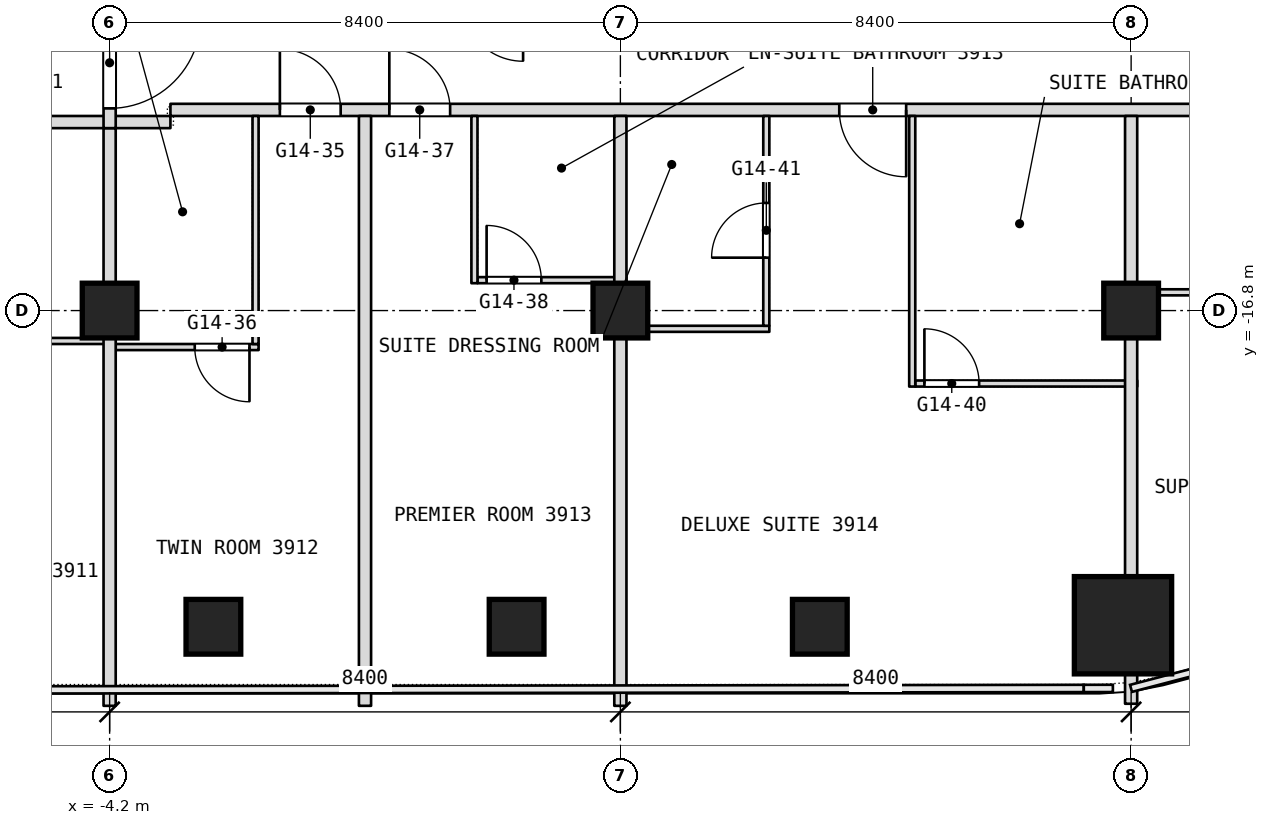
"""IFC4 building model, lengths in metres.
Left out: names, types, materials, properties, quantities, classifications, styles, units other than length and angle.
Written with IfcOpenShell. Run it as: python <this file> out.ifc"""

import sys

from ifc_helpers import new_model, si_unit, direction, frame, frame_2d, origin, origin_2d, place, context, subcontext, project, spatial, rectangle, extrude, element, fill, save


model = new_model("IFC4")
c1 = context("Model", 3, precision=1e-05, world=origin(), true_north=direction((0.0, 1.0)))
c2 = subcontext(c1, "Body", "Model", "MODEL_VIEW")
j1 = project(units=[si_unit("LENGTHUNIT", "METRE"), si_unit("PLANEANGLEUNIT", "RADIAN")], contexts=[c1])
p1 = place(None, origin())
s1 = spatial("IfcSite", under=j1, at=p1, CompositionType="ELEMENT")
p2 = place(p1, origin())
s2 = spatial("IfcBuilding", under=s1, at=p2, CompositionType="ELEMENT")
p3 = place(p2, frame((0.0, 0.0, 166.1)))
s3 = spatial("IfcBuildingStorey", under=s2, at=p3, CompositionType="ELEMENT", Elevation=166.1)
p4 = place(p3, frame((12.466, -21.975, 0.0), z_axis=(0.0, 0.0, 1.0), x_axis=(1.0, 0.0, 0.0)))
e1 = element("IfcColumn", 1, at=p4, inside=s3, PredefinedType="COLUMN", context=c2, shape_type="SweptSolid", body=[
    extrude(rectangle(XDim=1.6, YDim=1.6, at=origin_2d()), origin(), (0.0, 0.0, 1.0), 3.6),
])
for number, where, z_axis, x_axis in (
    (2, (-4.2, -16.8, 0.0), (0.0, 0.0, 1.0), (1.0, 0.0, 0.0)),
    (3, (4.2, -16.8, 0.0), (0.0, 0.0, 1.0), (1.0, 0.0, 0.0)),
    (4, (12.6, -16.8, 0.0), (0.0, 0.0, 1.0), (1.0, 0.0, 0.0)),
    (5, (7.48, -22.0, 0.0), (0.0, 0.0, 1.0), (1.0, 0.0, 0.0)),
    (6, (2.493, -22.0, 0.0), (0.0, 0.0, 1.0), (1.0, 0.0, 0.0)),
    (7, (-2.493, -22.0, 0.0), (0.0, 0.0, 1.0), (1.0, 0.0, 0.0)),
):
    element("IfcColumn", number, at=place(p3, frame(where, z_axis=z_axis, x_axis=x_axis)), inside=s3, PredefinedType="COLUMN", context=c2, shape_type="SweptSolid", body=[
        extrude(rectangle(XDim=0.9, YDim=0.9, at=origin_2d()), origin(), (0.0, 0.0, 1.0), 3.6),
    ])
p5 = place(p3, frame((9.05, -18.0, 0.0), z_axis=(0.0, 0.0, 1.0), x_axis=(1.0, 0.0, 0.0)))
e8 = element("IfcWall", 8, at=p5, inside=s3, PredefinedType="PARTITIONING", context=c2, shape_type="SweptSolid", body=[
    extrude(rectangle(XDim=3.65, YDim=0.1, at=frame_2d((1.825, 0.0))), origin(), (0.0, 0.0, 1.0), 3.3),
])
p6 = place(p5, frame((0.15, 0.0, 0.0)))
e9 = element("IfcOpeningElement", 9, at=p6, cuts=e8, PredefinedType="OPENING", context=c2, shape_type="SweptSolid", body=[
    extrude(rectangle(XDim=0.9, YDim=2.1, at=frame_2d((0.45, 1.05))), frame((0.0, 0.05, 0.0), z_axis=(0.0, -1.0, 0.0), x_axis=(1.0, 0.0, 0.0)), (0.0, 0.0, 1.0), 0.1),
])
p7 = place(p3, frame((-4.1, -17.4, 0.0), z_axis=(0.0, 0.0, 1.0), x_axis=(1.0, 0.0, 0.0)))
e10 = element("IfcWall", 10, at=p7, inside=s3, PredefinedType="PARTITIONING", context=c2, shape_type="SweptSolid", body=[
    extrude(rectangle(XDim=2.35, YDim=0.1, at=frame_2d((1.175, 0.0))), origin(), (0.0, 0.0, 1.0), 3.3),
])
p8 = place(p7, frame((1.3, 0.0, 0.0)))
e11 = element("IfcOpeningElement", 11, at=p8, cuts=e10, PredefinedType="OPENING", context=c2, shape_type="SweptSolid", body=[
    extrude(rectangle(XDim=0.9, YDim=2.1, at=frame_2d((0.45, 1.05))), frame((0.0, 0.05, 0.0), z_axis=(0.0, -1.0, 0.0), x_axis=(1.0, 0.0, 0.0)), (0.0, 0.0, 1.0), 0.1),
])
p9 = place(p3, frame((-6.55, -17.3, 0.0), z_axis=(0.0, 0.0, 1.0), x_axis=(1.0, 0.0, 0.0)))
e12 = element("IfcWall", 12, at=p9, inside=s3, PredefinedType="PARTITIONING", context=c2, shape_type="SweptSolid", body=[
    extrude(rectangle(XDim=2.45, YDim=0.1, at=frame_2d((1.225, 0.0))), origin(), (0.0, 0.0, 1.0), 3.3),
])
p10 = place(p9, frame((0.15, 0.0, 0.0)))
e13 = element("IfcOpeningElement", 13, at=p10, cuts=e12, PredefinedType="OPENING", context=c2, shape_type="SweptSolid", body=[
    extrude(rectangle(XDim=0.9, YDim=2.1, at=frame_2d((0.45, 1.05))), frame((0.0, 0.05, 0.0), z_axis=(0.0, -1.0, 0.0), x_axis=(1.0, 0.0, 0.0)), (0.0, 0.0, 1.0), 0.1),
])
p11 = place(p3, frame((4.3, -17.1, 0.0), z_axis=(0.0, 0.0, 1.0), x_axis=(1.0, 0.0, 0.0)))
e14 = element("IfcWall", 14, at=p11, inside=s3, PredefinedType="PARTITIONING", context=c2, shape_type="SweptSolid", body=[
    extrude(rectangle(XDim=2.35, YDim=0.1, at=frame_2d((1.175, 0.0))), origin(), (0.0, 0.0, 1.0), 3.3),
])
p12 = place(p3, frame((12.7, -16.5, 0.0), z_axis=(0.0, 0.0, 1.0), x_axis=(1.0, 0.0, 0.0)))
e15 = element("IfcWall", 15, at=p12, inside=s3, PredefinedType="PARTITIONING", context=c2, shape_type="SweptSolid", body=[
    extrude(rectangle(XDim=2.35, YDim=0.1, at=frame_2d((1.175, 0.0))), origin(), (0.0, 0.0, 1.0), 3.3),
])
p13 = place(p12, frame((1.3, 0.0, 0.0)))
e16 = element("IfcOpeningElement", 16, at=p13, cuts=e15, PredefinedType="OPENING", context=c2, shape_type="SweptSolid", body=[
    extrude(rectangle(XDim=0.9, YDim=2.1, at=frame_2d((0.45, 1.05))), frame((0.0, 0.05, 0.0), z_axis=(0.0, -1.0, 0.0), x_axis=(1.0, 0.0, 0.0)), (0.0, 0.0, 1.0), 0.1),
])
p14 = place(p3, frame((1.85, -16.3, 0.0), z_axis=(0.0, 0.0, 1.0), x_axis=(1.0, 0.0, 0.0)))
e17 = element("IfcWall", 17, at=p14, inside=s3, PredefinedType="PARTITIONING", context=c2, shape_type="SweptSolid", body=[
    extrude(rectangle(XDim=2.45, YDim=0.1, at=frame_2d((1.225, 0.0))), origin(), (0.0, 0.0, 1.0), 3.3),
])
p15 = place(p14, frame((0.15, 0.0, 0.0)))
e18 = element("IfcOpeningElement", 18, at=p15, cuts=e17, PredefinedType="OPENING", context=c2, shape_type="SweptSolid", body=[
    extrude(rectangle(XDim=0.9, YDim=2.1, at=frame_2d((0.45, 1.05))), frame((0.0, 0.05, 0.0), z_axis=(0.0, -1.0, 0.0), x_axis=(1.0, 0.0, 0.0)), (0.0, 0.0, 1.0), 0.1),
])
p16 = place(p3, frame((-12.4, -13.7, 0.0), z_axis=(0.0, 0.0, 1.0), x_axis=(1.0, 0.0, 0.0)))
e19 = element("IfcWall", 19, at=p16, inside=s3, PredefinedType="PARTITIONING", context=c2, shape_type="SweptSolid", body=[
    extrude(rectangle(XDim=9.2, YDim=0.2, at=frame_2d((4.6, 0.0))), origin(), (0.0, 0.0, 1.0), 3.3),
])
p17 = place(p16, frame((1.35, 0.0, 0.0)))
e20 = element("IfcOpeningElement", 20, at=p17, cuts=e19, PredefinedType="OPENING", context=c2, shape_type="SweptSolid", body=[
    extrude(rectangle(XDim=1.1, YDim=2.1, at=frame_2d((0.55, 1.05))), frame((0.0, 0.1, 0.0), z_axis=(0.0, -1.0, 0.0), x_axis=(1.0, 0.0, 0.0)), (0.0, 0.0, 1.0), 0.2),
])
p18 = place(p3, frame((-3.2, -13.5, 0.0), z_axis=(0.0, 0.0, 1.0), x_axis=(1.0, 0.0, 0.0)))
e21 = element("IfcWall", 21, at=p18, inside=s3, PredefinedType="PARTITIONING", context=c2, shape_type="SweptSolid", body=[
    extrude(rectangle(XDim=19.9, YDim=0.2, at=frame_2d((9.95, 0.0))), origin(), (0.0, 0.0, 1.0), 3.3),
])
p19 = place(p18, frame((1.8, 0.0, 0.0)))
e22 = element("IfcOpeningElement", 22, at=p19, cuts=e21, PredefinedType="OPENING", context=c2, shape_type="SweptSolid", body=[
    extrude(rectangle(XDim=1.0, YDim=2.1, at=frame_2d((0.5, 1.05))), frame((0.0, 0.1, 0.0), z_axis=(0.0, -1.0, 0.0), x_axis=(1.0, 0.0, 0.0)), (0.0, 0.0, 1.0), 0.2),
])
p20 = place(p18, frame((3.6, 0.0, 0.0)))
e23 = element("IfcOpeningElement", 23, at=p20, cuts=e21, PredefinedType="OPENING", context=c2, shape_type="SweptSolid", body=[
    extrude(rectangle(XDim=1.0, YDim=2.1, at=frame_2d((0.5, 1.05))), frame((0.0, 0.1, 0.0), z_axis=(0.0, -1.0, 0.0), x_axis=(1.0, 0.0, 0.0)), (0.0, 0.0, 1.0), 0.2),
])
p21 = place(p18, frame((11.0, 0.0, 0.0)))
e24 = element("IfcOpeningElement", 24, at=p21, cuts=e21, PredefinedType="OPENING", context=c2, shape_type="SweptSolid", body=[
    extrude(rectangle(XDim=1.1, YDim=2.1, at=frame_2d((0.55, 1.05))), frame((0.0, 0.1, 0.0), z_axis=(0.0, -1.0, 0.0), x_axis=(1.0, 0.0, 0.0)), (0.0, 0.0, 1.0), 0.2),
])
p22 = place(p18, frame((18.6, 0.0, 0.0)))
e25 = element("IfcOpeningElement", 25, at=p22, cuts=e21, PredefinedType="OPENING", context=c2, shape_type="SweptSolid", body=[
    extrude(rectangle(XDim=1.0, YDim=2.1, at=frame_2d((0.5, 1.05))), frame((0.0, 0.1, 0.0), z_axis=(0.0, -1.0, 0.0), x_axis=(1.0, 0.0, 0.0)), (0.0, 0.0, 1.0), 0.2),
])
p23 = place(p3, frame((12.6, -23.266, 0.0), z_axis=(0.0, 0.0, 1.0), x_axis=(0.0, 1.0, 0.0)))
e26 = element("IfcWall", 26, at=p23, inside=s3, PredefinedType="PARTITIONING", context=c2, shape_type="SweptSolid", body=[
    extrude(rectangle(XDim=0.491, YDim=0.2, at=frame_2d((0.246, 0.0))), origin(), (0.0, 0.0, 1.0), 3.3),
])
p24 = place(p3, frame((12.6, -21.175, 0.0), z_axis=(0.0, 0.0, 1.0), x_axis=(0.0, 1.0, 0.0)))
e27 = element("IfcWall", 27, at=p24, inside=s3, PredefinedType="PARTITIONING", context=c2, shape_type="SweptSolid", body=[
    extrude(rectangle(XDim=7.575, YDim=0.2, at=frame_2d((3.788, 0.0))), origin(), (0.0, 0.0, 1.0), 2.486),
])
p25 = place(p3, frame((9.0, -18.05, 0.0), z_axis=(0.0, 0.0, 1.0), x_axis=(0.0, 1.0, 0.0)))
e28 = element("IfcWall", 28, at=p25, inside=s3, PredefinedType="PARTITIONING", context=c2, shape_type="SweptSolid", body=[
    extrude(rectangle(XDim=4.45, YDim=0.1, at=frame_2d((2.225, 0.0))), origin(), (0.0, 0.0, 1.0), 3.3),
])
p26 = place(p3, frame((6.6, -17.05, 0.0), z_axis=(0.0, 0.0, 1.0), x_axis=(0.0, 1.0, 0.0)))
e29 = element("IfcWall", 29, at=p26, inside=s3, PredefinedType="PARTITIONING", context=c2, shape_type="SweptSolid", body=[
    extrude(rectangle(XDim=3.45, YDim=0.1, at=frame_2d((1.725, 0.0))), origin(), (0.0, 0.0, 1.0), 3.3),
])
p27 = place(p26, frame((1.12, 0.0, 0.0)))
e30 = element("IfcOpeningElement", 30, at=p27, cuts=e29, PredefinedType="OPENING", context=c2, shape_type="SweptSolid", body=[
    extrude(rectangle(XDim=0.9, YDim=2.1, at=frame_2d((0.45, 1.05))), frame((0.0, 0.05, 0.0), z_axis=(0.0, -1.0, 0.0), x_axis=(1.0, 0.0, 0.0)), (0.0, 0.0, 1.0), 0.1),
])
p28 = place(p3, frame((4.2, -23.3, 0.0), z_axis=(0.0, 0.0, 1.0), x_axis=(0.0, 1.0, 0.0)))
e31 = element("IfcWall", 31, at=p28, inside=s3, PredefinedType="PARTITIONING", context=c2, shape_type="SweptSolid", body=[
    extrude(rectangle(XDim=9.7, YDim=0.2, at=frame_2d((4.85, 0.0))), origin(), (0.0, 0.0, 1.0), 2.486),
])
p29 = place(p3, frame((1.8, -16.35, 0.0), z_axis=(0.0, 0.0, 1.0), x_axis=(0.0, 1.0, 0.0)))
e32 = element("IfcWall", 32, at=p29, inside=s3, PredefinedType="PARTITIONING", context=c2, shape_type="SweptSolid", body=[
    extrude(rectangle(XDim=2.75, YDim=0.1, at=frame_2d((1.375, 0.0))), origin(), (0.0, 0.0, 1.0), 3.3),
])
p30 = place(p3, frame((0.0, -23.3, 0.0), z_axis=(0.0, 0.0, 1.0), x_axis=(0.0, 1.0, 0.0)))
e33 = element("IfcWall", 33, at=p30, inside=s3, PredefinedType="PARTITIONING", context=c2, shape_type="SweptSolid", body=[
    extrude(rectangle(XDim=9.7, YDim=0.2, at=frame_2d((4.85, 0.0))), origin(), (0.0, 0.0, 1.0), 3.3),
])
p31 = place(p3, frame((-1.8, -17.35, 0.0), z_axis=(0.0, 0.0, 1.0), x_axis=(0.0, 1.0, 0.0)))
e34 = element("IfcWall", 34, at=p31, inside=s3, PredefinedType="PARTITIONING", context=c2, shape_type="SweptSolid", body=[
    extrude(rectangle(XDim=3.75, YDim=0.1, at=frame_2d((1.875, 0.0))), origin(), (0.0, 0.0, 1.0), 3.3),
])
p32 = place(p3, frame((-4.2, -23.3, 0.0), z_axis=(0.0, 0.0, 1.0), x_axis=(0.0, 1.0, 0.0)))
e35 = element("IfcWall", 35, at=p32, inside=s3, PredefinedType="PARTITIONING", context=c2, shape_type="SweptSolid", body=[
    extrude(rectangle(XDim=9.5, YDim=0.2, at=frame_2d((4.75, 0.0))), origin(), (0.0, 0.0, 1.0), 2.486),
])
p33 = place(p3, frame((-4.2, -13.8, 0.0), z_axis=(0.0, 0.0, 1.0), x_axis=(0.0, 1.0, 0.0)))
e36 = element("IfcWall", 36, at=p33, inside=s3, PredefinedType="PARTITIONING", context=c2, shape_type="SweptSolid", body=[
    extrude(rectangle(XDim=13.8, YDim=0.2, at=frame_2d((6.9, 0.0))), origin(), (0.0, 0.0, 1.0), 2.486),
])
p34 = place(p33, frame((12.15, 0.0, 0.0)))
e37 = element("IfcOpeningElement", 37, at=p34, cuts=e36, PredefinedType="OPENING", context=c2, shape_type="SweptSolid", body=[
    extrude(rectangle(XDim=1.5, YDim=2.1, at=frame_2d((0.75, 1.05))), frame((0.0, 0.1, 0.0), z_axis=(0.0, -1.0, 0.0), x_axis=(1.0, 0.0, 0.0)), (0.0, 0.0, 1.0), 0.2),
])
p35 = place(p33, frame((0.325, 0.0, 0.0)))
e38 = element("IfcOpeningElement", 38, at=p35, cuts=e36, PredefinedType="OPENING", context=c2, shape_type="SweptSolid", body=[
    extrude(rectangle(XDim=1.5, YDim=2.1, at=frame_2d((0.75, 1.05))), frame((0.0, 0.1, 0.0), z_axis=(0.0, -1.0, 0.0), x_axis=(1.0, 0.0, 0.0)), (0.0, 0.0, 1.0), 0.2),
])
p36 = place(p6, origin())
e39 = element("IfcDoor", 39, at=p36, inside=s3, OperationType="SINGLE_SWING_LEFT", PredefinedType="DOOR", context=c2, shape_type="SweptSolid", body=[
    extrude(rectangle(XDim=0.9, YDim=2.1, at=frame_2d((0.45, 1.05))), frame((0.0, 0.025, 0.0), z_axis=(0.0, -1.0, 0.0), x_axis=(1.0, 0.0, 0.0)), (0.0, 0.0, 1.0), 0.05),
])
fill(e9, e39)
p37 = place(p8, origin())
e40 = element("IfcDoor", 40, at=p37, inside=s3, OperationType="SINGLE_SWING_RIGHT", PredefinedType="DOOR", context=c2, shape_type="SweptSolid", body=[
    extrude(rectangle(XDim=0.9, YDim=2.1, at=frame_2d((0.45, 1.05))), frame((0.0, 0.025, 0.0), z_axis=(0.0, -1.0, 0.0), x_axis=(1.0, 0.0, 0.0)), (0.0, 0.0, 1.0), 0.05),
])
fill(e11, e40)
p38 = place(p15, origin())
e41 = element("IfcDoor", 41, at=p38, inside=s3, OperationType="SINGLE_SWING_LEFT", PredefinedType="DOOR", context=c2, shape_type="SweptSolid", body=[
    extrude(rectangle(XDim=0.9, YDim=2.1, at=frame_2d((0.45, 1.05))), frame((0.0, 0.025, 0.0), z_axis=(0.0, -1.0, 0.0), x_axis=(1.0, 0.0, 0.0)), (0.0, 0.0, 1.0), 0.05),
])
fill(e18, e41)
p39 = place(p19, origin())
e42 = element("IfcDoor", 42, at=p39, inside=s3, OperationType="SINGLE_SWING_LEFT", PredefinedType="DOOR", context=c2, shape_type="SweptSolid", body=[
    extrude(rectangle(XDim=1.0, YDim=2.1, at=frame_2d((0.5, 1.05))), frame((0.0, 0.025, 0.0), z_axis=(0.0, -1.0, 0.0), x_axis=(1.0, 0.0, 0.0)), (0.0, 0.0, 1.0), 0.05),
])
fill(e22, e42)
p40 = place(p20, origin())
e43 = element("IfcDoor", 43, at=p40, inside=s3, OperationType="SINGLE_SWING_LEFT", PredefinedType="DOOR", context=c2, shape_type="SweptSolid", body=[
    extrude(rectangle(XDim=1.0, YDim=2.1, at=frame_2d((0.5, 1.05))), frame((0.0, 0.025, 0.0), z_axis=(0.0, -1.0, 0.0), x_axis=(1.0, 0.0, 0.0)), (0.0, 0.0, 1.0), 0.05),
])
fill(e23, e43)
p41 = place(p21, origin())
e44 = element("IfcDoor", 44, at=p41, inside=s3, OperationType="SINGLE_SWING_LEFT", PredefinedType="DOOR", context=c2, shape_type="SweptSolid", body=[
    extrude(rectangle(XDim=1.1, YDim=2.1, at=frame_2d((0.55, 1.05))), frame((0.0, 0.025, 0.0), z_axis=(0.0, -1.0, 0.0), x_axis=(1.0, 0.0, 0.0)), (0.0, 0.0, 1.0), 0.05),
])
fill(e24, e44)
p42 = place(p27, origin())
e45 = element("IfcDoor", 45, at=p42, inside=s3, OperationType="SINGLE_SWING_LEFT", PredefinedType="DOOR", context=c2, shape_type="SweptSolid", body=[
    extrude(rectangle(XDim=0.9, YDim=2.1, at=frame_2d((0.45, 1.05))), frame((0.0, 0.025, 0.0), z_axis=(0.0, -1.0, 0.0), x_axis=(1.0, 0.0, 0.0)), (0.0, 0.0, 1.0), 0.05),
])
fill(e30, e45)
p43 = place(p35, origin())
e46 = element("IfcDoor", 46, at=p43, inside=s3, OperationType="DOUBLE_DOOR_DOUBLE_SWING", PredefinedType="DOOR", context=c2, shape_type="SweptSolid", body=[
    extrude(rectangle(XDim=1.5, YDim=2.1, at=frame_2d((0.75, 1.05))), frame((0.0, 0.025, 0.0), z_axis=(0.0, -1.0, 0.0), x_axis=(1.0, 0.0, 0.0)), (0.0, 0.0, 1.0), 0.05),
])
fill(e38, e46)
save(model, sys.argv[1])
